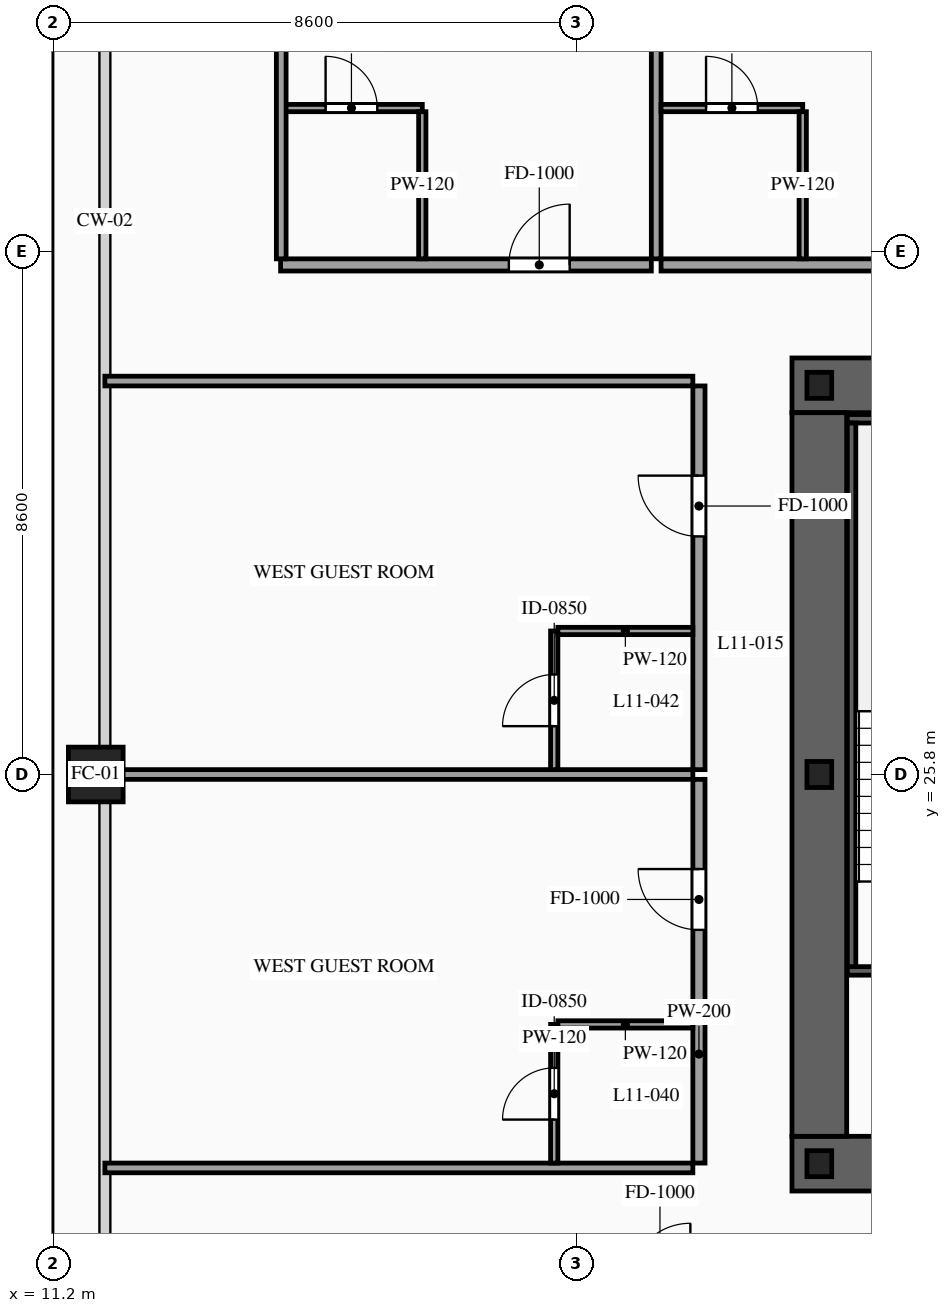
"""IFC4 building model, lengths in metres.
Left out: names, types, materials, properties, quantities, classifications, styles, units other than length and angle.
Written with IfcOpenShell. Run it as: python <this file> out.ifc"""

import sys

from ifc_helpers import new_model, si_unit, direction, frame, frame_2d, origin, origin_2d, place, context, subcontext, project, spatial, rectangle, hollow_rectangle, i_section, extrude, source, transform, mapped, element, fill, save


model = new_model("IFC4")
c1 = context("Model", 3, precision=1e-05, world=origin(), true_north=direction((0.0, 1.0)))
c2 = subcontext(c1, "Body", "Model", "MODEL_VIEW")
j1 = project(units=[si_unit("LENGTHUNIT", "METRE"), si_unit("PLANEANGLEUNIT", "RADIAN")], contexts=[c1])
p1 = place(None, origin())
s1 = spatial("IfcSite", under=j1, at=p1, CompositionType="ELEMENT")
p2 = place(p1, origin())
s2 = spatial("IfcBuilding", under=s1, at=p2, CompositionType="ELEMENT")
p3 = place(p2, frame((0.0, 0.0, 46.0)))
s3 = spatial("IfcBuildingStorey", under=s2, at=p3, CompositionType="ELEMENT", Elevation=46.0)
p4 = place(p3, frame((23.35, 19.4, 0.0), z_axis=(0.0, 0.0, 1.0), x_axis=(1.0, 0.0, 0.0)))
e1 = element("IfcWall", 1, at=p4, inside=s3, PredefinedType="SHEAR", context=c2, shape_type="SweptSolid", body=[
    extrude(rectangle(XDim=27.3, YDim=0.9, at=frame_2d((13.65, 0.0))), origin(), (0.0, 0.0, 1.0), 3.6),
])
p5 = place(p4, frame((2.1, 0.0, 0.0)))
e2 = element("IfcOpeningElement", 2, at=p5, cuts=e1, PredefinedType="OPENING", context=c2, shape_type="SweptSolid", body=[
    extrude(rectangle(XDim=1.1, YDim=2.2, at=frame_2d((0.55, 1.1))), frame((0.0, 0.465, 0.0), z_axis=(0.0, -1.0, 0.0), x_axis=(1.0, 0.0, 0.0)), (0.0, 0.0, 1.0), 0.93),
])
p6 = place(p4, frame((10.0, 0.0, 0.0)))
e3 = element("IfcOpeningElement", 3, at=p6, cuts=e1, PredefinedType="OPENING", context=c2, shape_type="SweptSolid", body=[
    extrude(rectangle(XDim=1.1, YDim=2.2, at=frame_2d((0.55, 1.1))), frame((0.0, 0.465, 0.0), z_axis=(0.0, -1.0, 0.0), x_axis=(1.0, 0.0, 0.0)), (0.0, 0.0, 1.0), 0.93),
])
p7 = place(p4, frame((23.2, 0.0, 0.0)))
e4 = element("IfcOpeningElement", 4, at=p7, cuts=e1, PredefinedType="OPENING", context=c2, shape_type="SweptSolid", body=[
    extrude(rectangle(XDim=1.1, YDim=2.2, at=frame_2d((0.55, 1.1))), frame((0.0, 0.465, 0.0), z_axis=(0.0, -1.0, 0.0), x_axis=(1.0, 0.0, 0.0)), (0.0, 0.0, 1.0), 0.93),
])
p8 = place(p4, frame((19.82, 0.0, 0.0)))
e5 = element("IfcOpeningElement", 5, at=p8, cuts=e1, PredefinedType="OPENING", context=c2, shape_type="SweptSolid", body=[
    extrude(rectangle(XDim=0.9, YDim=2.15, at=frame_2d((0.45, 1.075))), frame((0.0, 0.465, 0.0), z_axis=(0.0, -1.0, 0.0), x_axis=(1.0, 0.0, 0.0)), (0.0, 0.0, 1.0), 0.93),
])
p9 = place(p4, frame((18.38, 0.0, 0.0)))
e6 = element("IfcOpeningElement", 6, at=p9, cuts=e1, PredefinedType="OPENING", context=c2, shape_type="SweptSolid", body=[
    extrude(rectangle(XDim=0.9, YDim=2.15, at=frame_2d((0.45, 1.075))), frame((0.0, 0.465, 0.0), z_axis=(0.0, -1.0, 0.0), x_axis=(1.0, 0.0, 0.0)), (0.0, 0.0, 1.0), 0.93),
])
p10 = place(p3, frame((23.35, 32.2, 0.0), z_axis=(0.0, 0.0, 1.0), x_axis=(1.0, 0.0, 0.0)))
e7 = element("IfcWall", 7, at=p10, inside=s3, PredefinedType="SHEAR", context=c2, shape_type="SweptSolid", body=[
    extrude(rectangle(XDim=27.3, YDim=0.9, at=frame_2d((13.65, 0.0))), origin(), (0.0, 0.0, 1.0), 3.6),
])
p11 = place(p10, frame((4.72, 0.0, 0.0)))
e8 = element("IfcOpeningElement", 8, at=p11, cuts=e7, PredefinedType="OPENING", context=c2, shape_type="SweptSolid", body=[
    extrude(rectangle(XDim=0.9, YDim=2.15, at=frame_2d((0.45, 1.075))), frame((0.0, 0.465, 0.0), z_axis=(0.0, -1.0, 0.0), x_axis=(1.0, 0.0, 0.0)), (0.0, 0.0, 1.0), 0.93),
])
p12 = place(p10, frame((10.0, 0.0, 0.0)))
e9 = element("IfcOpeningElement", 9, at=p12, cuts=e7, PredefinedType="OPENING", context=c2, shape_type="SweptSolid", body=[
    extrude(rectangle(XDim=1.1, YDim=2.2, at=frame_2d((0.55, 1.1))), frame((0.0, 0.465, 0.0), z_axis=(0.0, -1.0, 0.0), x_axis=(1.0, 0.0, 0.0)), (0.0, 0.0, 1.0), 0.93),
])
p13 = place(p10, frame((15.85, 0.0, 0.0)))
e10 = element("IfcOpeningElement", 10, at=p13, cuts=e7, PredefinedType="OPENING", context=c2, shape_type="SweptSolid", body=[
    extrude(rectangle(XDim=1.1, YDim=2.2, at=frame_2d((0.55, 1.1))), frame((0.0, 0.465, 0.0), z_axis=(0.0, -1.0, 0.0), x_axis=(1.0, 0.0, 0.0)), (0.0, 0.0, 1.0), 0.93),
])
p14 = place(p10, frame((19.05, 0.0, 0.0)))
e11 = element("IfcOpeningElement", 11, at=p14, cuts=e7, PredefinedType="OPENING", context=c2, shape_type="SweptSolid", body=[
    extrude(rectangle(XDim=0.9, YDim=2.15, at=frame_2d((0.45, 1.075))), frame((0.0, 0.465, 0.0), z_axis=(0.0, -1.0, 0.0), x_axis=(1.0, 0.0, 0.0)), (0.0, 0.0, 1.0), 0.93),
])
m1 = source(origin(), c2, "Body", "SweptSolid", [
    extrude(rectangle(XDim=11.9, YDim=0.9, at=frame_2d((5.95, 0.0))), origin(), (0.0, 0.0, 1.0), 3.6),
])
p15 = place(p3, frame((23.8, 19.85, 0.0), z_axis=(0.0, 0.0, 1.0), x_axis=(0.0, 1.0, 0.0)))
e12 = element("IfcWall", 12, at=p15, inside=s3, PredefinedType="SHEAR", context=c2, shape_type="MappedRepresentation", body=[
    mapped(m1, transform((0.0, 0.0, 0.0), scale=1.0)),
])
m2 = source(origin(), c2, "Body", "SweptSolid", [
    extrude(i_section(OverallWidth=0.407, OverallDepth=0.428, WebThickness=0.02, FlangeThickness=0.035, at=origin_2d()), origin(), (0.0, 0.0, 1.0), 3.6),
])
for number, where, z_axis, x_axis in (
    (13, (23.8, 19.4, 0.0), (0.0, 0.0, 1.0), (1.0, 0.0, 0.0)),
    (14, (23.8, 25.8, 0.0), (0.0, 0.0, 1.0), (1.0, 0.0, 0.0)),
    (15, (23.8, 32.2, 0.0), (0.0, 0.0, 1.0), (1.0, 0.0, 0.0)),
):
    element("IfcColumn", number, at=place(p3, frame(where, z_axis=z_axis, x_axis=x_axis)), inside=s3, PredefinedType="COLUMN", context=c2, shape_type="MappedRepresentation", body=[
        mapped(m2, transform((0.0, 0.0, 0.0), scale=1.0)),
    ])
m3 = source(origin(), c2, "Body", "SweptSolid", [
    extrude(hollow_rectangle(XDim=0.9, YDim=0.9, WallThickness=0.042, at=origin_2d()), origin(), (0.0, 0.0, 1.0), 3.6),
])
p16 = place(p3, frame((11.9, 25.8, 0.0), z_axis=(0.0, 0.0, 1.0), x_axis=(1.0, 0.0, 0.0)))
e16 = element("IfcColumn", 16, at=p16, inside=s3, PredefinedType="COLUMN", context=c2, shape_type="MappedRepresentation", body=[
    mapped(m3, transform((0.0, 0.0, 0.0), scale=1.0)),
])
p17 = place(p3, frame((24.26, 22.57, 0.0), z_axis=(0.0, 0.0, 1.0), x_axis=(1.0, 0.0, 0.0)))
e17 = element("IfcWall", 17, at=p17, inside=s3, PredefinedType="SOLIDWALL", context=c2, shape_type="SweptSolid", body=[
    extrude(rectangle(XDim=3.28, YDim=0.14, at=frame_2d((1.64, 0.0))), origin(), (0.0, 0.0, 1.0), 3.38),
])
p18 = place(p17, frame((1.09, 0.0, 0.0)))
e18 = element("IfcOpeningElement", 18, at=p18, cuts=e17, PredefinedType="OPENING", context=c2, shape_type="SweptSolid", body=[
    extrude(rectangle(XDim=1.1, YDim=2.2, at=frame_2d((0.55, 1.1))), frame((0.0, 0.085, 0.0), z_axis=(0.0, -1.0, 0.0), x_axis=(1.0, 0.0, 0.0)), (0.0, 0.0, 1.0), 0.17),
])
m4 = source(origin(), c2, "Body", "SweptSolid", [
    extrude(rectangle(XDim=3.28, YDim=0.14, at=frame_2d((1.64, 0.0))), origin(), (0.0, 0.0, 1.0), 3.38),
])
p19 = place(p3, frame((24.26, 31.65, 0.0), z_axis=(0.0, 0.0, 1.0), x_axis=(1.0, 0.0, 0.0)))
e19 = element("IfcWall", 19, at=p19, inside=s3, PredefinedType="SOLIDWALL", context=c2, shape_type="MappedRepresentation", body=[
    mapped(m4, transform((0.0, 0.0, 0.0), scale=1.0)),
])
m5 = source(origin(), c2, "Body", "SweptSolid", [
    extrude(rectangle(XDim=8.94, YDim=0.14, at=frame_2d((4.47, 0.0))), origin(), (0.0, 0.0, 1.0), 3.38),
])
p20 = place(p3, frame((24.33, 22.64, 0.0), z_axis=(0.0, 0.0, 1.0), x_axis=(0.0, 1.0, 0.0)))
e20 = element("IfcWall", 20, at=p20, inside=s3, PredefinedType="SOLIDWALL", context=c2, shape_type="MappedRepresentation", body=[
    mapped(m5, transform((0.0, 0.0, 0.0), scale=1.0)),
])
p21 = place(p3, frame((14.94, 34.18, 0.0), z_axis=(0.0, 0.0, 1.0), x_axis=(1.0, 0.0, 0.0)))
e21 = element("IfcWall", 21, at=p21, inside=s3, PredefinedType="PARTITIONING", context=c2, shape_type="SweptSolid", body=[
    extrude(rectangle(XDim=6.097, YDim=0.2, at=frame_2d((3.049, 0.0))), origin(), (0.0, 0.0, 1.0), 3.38),
])
p22 = place(p21, frame((3.754, 0.0, 0.0)))
e22 = element("IfcOpeningElement", 22, at=p22, cuts=e21, PredefinedType="OPENING", context=c2, shape_type="SweptSolid", body=[
    extrude(rectangle(XDim=1.0, YDim=2.2, at=frame_2d((0.5, 1.1))), frame((0.0, 0.115, 0.0), z_axis=(0.0, -1.0, 0.0), x_axis=(1.0, 0.0, 0.0)), (0.0, 0.0, 1.0), 0.23),
])
m6 = source(origin(), c2, "Body", "SweptSolid", [
    extrude(rectangle(XDim=16.47, YDim=0.16, at=frame_2d((8.235, 0.0))), origin(), (0.0, 0.0, 1.0), 3.38),
])
p23 = place(p3, frame((21.117, 34.28, 0.0), z_axis=(0.0, 0.0, 1.0), x_axis=(0.0, 1.0, 0.0)))
e23 = element("IfcWall", 23, at=p23, inside=s3, PredefinedType="PARTITIONING", context=c2, shape_type="MappedRepresentation", body=[
    mapped(m6, transform((0.0, 0.0, 0.0), scale=1.0)),
])
p24 = place(p3, frame((14.94, 36.76, 0.0), z_axis=(0.0, 0.0, 1.0), x_axis=(1.0, 0.0, 0.0)))
e24 = element("IfcWall", 24, at=p24, inside=s3, PredefinedType="PARTITIONING", context=c2, shape_type="SweptSolid", body=[
    extrude(rectangle(XDim=2.33, YDim=0.12, at=frame_2d((1.165, 0.0))), origin(), (0.0, 0.0, 1.0), 3.38),
])
p25 = place(p24, frame((0.74, 0.0, 0.0)))
e25 = element("IfcOpeningElement", 25, at=p25, cuts=e24, PredefinedType="OPENING", context=c2, shape_type="SweptSolid", body=[
    extrude(rectangle(XDim=0.85, YDim=2.1, at=frame_2d((0.425, 1.05))), frame((0.0, 0.075, 0.0), z_axis=(0.0, -1.0, 0.0), x_axis=(1.0, 0.0, 0.0)), (0.0, 0.0, 1.0), 0.15),
])
m7 = source(origin(), c2, "Body", "SweptSolid", [
    extrude(rectangle(XDim=2.42, YDim=0.12, at=frame_2d((1.21, 0.0))), origin(), (0.0, 0.0, 1.0), 3.38),
])
p26 = place(p3, frame((17.27, 34.28, 0.0), z_axis=(0.0, 0.0, 1.0), x_axis=(0.0, 1.0, 0.0)))
e26 = element("IfcWall", 26, at=p26, inside=s3, PredefinedType="PARTITIONING", context=c2, shape_type="MappedRepresentation", body=[
    mapped(m7, transform((0.0, 0.0, 0.0), scale=1.0)),
])
p27 = place(p3, frame((21.197, 34.18, 0.0), z_axis=(0.0, 0.0, 1.0), x_axis=(1.0, 0.0, 0.0)))
e27 = element("IfcWall", 27, at=p27, inside=s3, PredefinedType="PARTITIONING", context=c2, shape_type="SweptSolid", body=[
    extrude(rectangle(XDim=7.063, YDim=0.2, at=frame_2d((3.531, 0.0))), origin(), (0.0, 0.0, 1.0), 3.38),
])
p28 = place(p27, frame((4.237, 0.0, 0.0)))
e28 = element("IfcOpeningElement", 28, at=p28, cuts=e27, PredefinedType="OPENING", context=c2, shape_type="SweptSolid", body=[
    extrude(rectangle(XDim=1.0, YDim=2.2, at=frame_2d((0.5, 1.1))), frame((0.0, 0.115, 0.0), z_axis=(0.0, -1.0, 0.0), x_axis=(1.0, 0.0, 0.0)), (0.0, 0.0, 1.0), 0.23),
])
p29 = place(p3, frame((21.197, 36.76, 0.0), z_axis=(0.0, 0.0, 1.0), x_axis=(1.0, 0.0, 0.0)))
e29 = element("IfcWall", 29, at=p29, inside=s3, PredefinedType="PARTITIONING", context=c2, shape_type="SweptSolid", body=[
    extrude(rectangle(XDim=2.33, YDim=0.12, at=frame_2d((1.165, 0.0))), origin(), (0.0, 0.0, 1.0), 3.38),
])
p30 = place(p29, frame((0.74, 0.0, 0.0)))
e30 = element("IfcOpeningElement", 30, at=p30, cuts=e29, PredefinedType="OPENING", context=c2, shape_type="SweptSolid", body=[
    extrude(rectangle(XDim=0.85, YDim=2.1, at=frame_2d((0.425, 1.05))), frame((0.0, 0.075, 0.0), z_axis=(0.0, -1.0, 0.0), x_axis=(1.0, 0.0, 0.0)), (0.0, 0.0, 1.0), 0.15),
])
p31 = place(p3, frame((23.527, 34.28, 0.0), z_axis=(0.0, 0.0, 1.0), x_axis=(0.0, 1.0, 0.0)))
e31 = element("IfcWall", 31, at=p31, inside=s3, PredefinedType="PARTITIONING", context=c2, shape_type="MappedRepresentation", body=[
    mapped(m7, transform((0.0, 0.0, 0.0), scale=1.0)),
])
m8 = source(origin(), c2, "Body", "SweptSolid", [
    extrude(rectangle(XDim=16.32, YDim=0.16, at=frame_2d((8.16, 0.0))), origin(), (0.0, 0.0, 1.0), 3.38),
])
p32 = place(p3, frame((14.95, 34.28, 0.0), z_axis=(0.0, 0.0, 1.0), x_axis=(0.0, 1.0, 0.0)))
e32 = element("IfcWall", 32, at=p32, inside=s3, PredefinedType="PARTITIONING", context=c2, shape_type="MappedRepresentation", body=[
    mapped(m8, transform((0.0, 0.0, 0.0), scale=1.0)),
])
p33 = place(p3, frame((21.82, 19.41, 0.0), z_axis=(0.0, 0.0, 1.0), x_axis=(0.0, 1.0, 0.0)))
e33 = element("IfcWall", 33, at=p33, inside=s3, PredefinedType="PARTITIONING", context=c2, shape_type="SweptSolid", body=[
    extrude(rectangle(XDim=6.31, YDim=0.2, at=frame_2d((3.155, 0.0))), origin(), (0.0, 0.0, 1.0), 3.38),
])
p34 = place(p33, frame((3.835, 0.0, 0.0)))
e34 = element("IfcOpeningElement", 34, at=p34, cuts=e33, PredefinedType="OPENING", context=c2, shape_type="SweptSolid", body=[
    extrude(rectangle(XDim=1.0, YDim=2.2, at=frame_2d((0.5, 1.1))), frame((0.0, 0.115, 0.0), z_axis=(0.0, -1.0, 0.0), x_axis=(1.0, 0.0, 0.0)), (0.0, 0.0, 1.0), 0.23),
])
m9 = source(origin(), c2, "Body", "SweptSolid", [
    extrude(rectangle(XDim=9.67, YDim=0.16, at=frame_2d((4.835, 0.0))), origin(), (0.0, 0.0, 1.0), 2.575),
])
p35 = place(p3, frame((12.05, 25.8, 0.0), z_axis=(0.0, 0.0, 1.0), x_axis=(1.0, 0.0, 0.0)))
e35 = element("IfcWall", 35, at=p35, inside=s3, PredefinedType="PARTITIONING", context=c2, shape_type="MappedRepresentation", body=[
    mapped(m9, transform((0.0, 0.0, 0.0), scale=1.0)),
])
m10 = source(origin(), c2, "Body", "SweptSolid", [
    extrude(rectangle(XDim=9.67, YDim=0.16, at=frame_2d((4.835, 0.0))), origin(), (0.0, 0.0, 1.0), 2.875),
])
p36 = place(p3, frame((12.05, 19.33, 0.0), z_axis=(0.0, 0.0, 1.0), x_axis=(1.0, 0.0, 0.0)))
e36 = element("IfcWall", 36, at=p36, inside=s3, PredefinedType="PARTITIONING", context=c2, shape_type="MappedRepresentation", body=[
    mapped(m10, transform((0.0, 0.0, 0.0), scale=1.0)),
])
p37 = place(p3, frame((19.44, 19.41, 0.0), z_axis=(0.0, 0.0, 1.0), x_axis=(0.0, 1.0, 0.0)))
e37 = element("IfcWall", 37, at=p37, inside=s3, PredefinedType="PARTITIONING", context=c2, shape_type="SweptSolid", body=[
    extrude(rectangle(XDim=2.28, YDim=0.12, at=frame_2d((1.14, 0.0))), origin(), (0.0, 0.0, 1.0), 3.38),
])
p38 = place(p37, frame((0.715, 0.0, 0.0)))
e38 = element("IfcOpeningElement", 38, at=p38, cuts=e37, PredefinedType="OPENING", context=c2, shape_type="SweptSolid", body=[
    extrude(rectangle(XDim=0.85, YDim=2.1, at=frame_2d((0.425, 1.05))), frame((0.0, 0.075, 0.0), z_axis=(0.0, -1.0, 0.0), x_axis=(1.0, 0.0, 0.0)), (0.0, 0.0, 1.0), 0.15),
])
m11 = source(origin(), c2, "Body", "SweptSolid", [
    extrude(rectangle(XDim=2.22, YDim=0.12, at=frame_2d((1.11, 0.0))), origin(), (0.0, 0.0, 1.0), 3.38),
])
p39 = place(p3, frame((19.5, 21.69, 0.0), z_axis=(0.0, 0.0, 1.0), x_axis=(1.0, 0.0, 0.0)))
e39 = element("IfcWall", 39, at=p39, inside=s3, PredefinedType="PARTITIONING", context=c2, shape_type="MappedRepresentation", body=[
    mapped(m11, transform((0.0, 0.0, 0.0), scale=1.0)),
])
p40 = place(p3, frame((21.82, 25.88, 0.0), z_axis=(0.0, 0.0, 1.0), x_axis=(0.0, 1.0, 0.0)))
e40 = element("IfcWall", 40, at=p40, inside=s3, PredefinedType="PARTITIONING", context=c2, shape_type="SweptSolid", body=[
    extrude(rectangle(XDim=6.31, YDim=0.2, at=frame_2d((3.155, 0.0))), origin(), (0.0, 0.0, 1.0), 3.38),
])
p41 = place(p40, frame((3.835, 0.0, 0.0)))
e41 = element("IfcOpeningElement", 41, at=p41, cuts=e40, PredefinedType="OPENING", context=c2, shape_type="SweptSolid", body=[
    extrude(rectangle(XDim=1.0, YDim=2.2, at=frame_2d((0.5, 1.1))), frame((0.0, 0.115, 0.0), z_axis=(0.0, -1.0, 0.0), x_axis=(1.0, 0.0, 0.0)), (0.0, 0.0, 1.0), 0.23),
])
p42 = place(p3, frame((12.05, 32.27, 0.0), z_axis=(0.0, 0.0, 1.0), x_axis=(1.0, 0.0, 0.0)))
e42 = element("IfcWall", 42, at=p42, inside=s3, PredefinedType="PARTITIONING", context=c2, shape_type="MappedRepresentation", body=[
    mapped(m10, transform((0.0, 0.0, 0.0), scale=1.0)),
])
p43 = place(p3, frame((19.44, 25.88, 0.0), z_axis=(0.0, 0.0, 1.0), x_axis=(0.0, 1.0, 0.0)))
e43 = element("IfcWall", 43, at=p43, inside=s3, PredefinedType="PARTITIONING", context=c2, shape_type="SweptSolid", body=[
    extrude(rectangle(XDim=2.28, YDim=0.12, at=frame_2d((1.14, 0.0))), origin(), (0.0, 0.0, 1.0), 3.38),
])
p44 = place(p43, frame((0.715, 0.0, 0.0)))
e44 = element("IfcOpeningElement", 44, at=p44, cuts=e43, PredefinedType="OPENING", context=c2, shape_type="SweptSolid", body=[
    extrude(rectangle(XDim=0.85, YDim=2.1, at=frame_2d((0.425, 1.05))), frame((0.0, 0.075, 0.0), z_axis=(0.0, -1.0, 0.0), x_axis=(1.0, 0.0, 0.0)), (0.0, 0.0, 1.0), 0.15),
])
p45 = place(p3, frame((19.5, 28.16, 0.0), z_axis=(0.0, 0.0, 1.0), x_axis=(1.0, 0.0, 0.0)))
e45 = element("IfcWall", 45, at=p45, inside=s3, PredefinedType="PARTITIONING", context=c2, shape_type="MappedRepresentation", body=[
    mapped(m11, transform((0.0, 0.0, 0.0), scale=1.0)),
])
m12 = source(origin(), c2, "Body", "SweptSolid", [
    extrude(rectangle(XDim=1.0, YDim=2.2, at=frame_2d((0.5, 1.1))), frame((0.0, 0.025, 0.0), z_axis=(0.0, -1.0, 0.0), x_axis=(1.0, 0.0, 0.0)), (0.0, 0.0, 1.0), 0.05),
])
p46 = place(p22, origin())
e46 = element("IfcDoor", 46, at=p46, inside=s3, OperationType="SINGLE_SWING_RIGHT", PredefinedType="DOOR", context=c2, shape_type="MappedRepresentation", body=[
    mapped(m12, transform((0.0, 0.0, 0.0), scale=1.0)),
])
fill(e22, e46)
m13 = source(origin(), c2, "Body", "SweptSolid", [
    extrude(rectangle(XDim=0.85, YDim=2.1, at=frame_2d((0.425, 1.05))), frame((0.0, 0.025, 0.0), z_axis=(0.0, -1.0, 0.0), x_axis=(1.0, 0.0, 0.0)), (0.0, 0.0, 1.0), 0.05),
])
p47 = place(p25, origin())
e47 = element("IfcDoor", 47, at=p47, inside=s3, OperationType="SINGLE_SWING_LEFT", PredefinedType="DOOR", context=c2, shape_type="MappedRepresentation", body=[
    mapped(m13, transform((0.0, 0.0, 0.0), scale=1.0)),
])
fill(e25, e47)
p48 = place(p30, origin())
e48 = element("IfcDoor", 48, at=p48, inside=s3, OperationType="SINGLE_SWING_LEFT", PredefinedType="DOOR", context=c2, shape_type="MappedRepresentation", body=[
    mapped(m13, transform((0.0, 0.0, 0.0), scale=1.0)),
])
fill(e30, e48)
p49 = place(p34, origin())
e49 = element("IfcDoor", 49, at=p49, inside=s3, OperationType="SINGLE_SWING_RIGHT", PredefinedType="DOOR", context=c2, shape_type="MappedRepresentation", body=[
    mapped(m12, transform((0.0, 0.0, 0.0), scale=1.0)),
])
fill(e34, e49)
p50 = place(p38, origin())
e50 = element("IfcDoor", 50, at=p50, inside=s3, OperationType="SINGLE_SWING_LEFT", PredefinedType="DOOR", context=c2, shape_type="MappedRepresentation", body=[
    mapped(m13, transform((0.0, 0.0, 0.0), scale=1.0)),
])
fill(e38, e50)
p51 = place(p41, origin())
e51 = element("IfcDoor", 51, at=p51, inside=s3, OperationType="SINGLE_SWING_RIGHT", PredefinedType="DOOR", context=c2, shape_type="MappedRepresentation", body=[
    mapped(m12, transform((0.0, 0.0, 0.0), scale=1.0)),
])
fill(e41, e51)
p52 = place(p44, origin())
e52 = element("IfcDoor", 52, at=p52, inside=s3, OperationType="SINGLE_SWING_LEFT", PredefinedType="DOOR", context=c2, shape_type="MappedRepresentation", body=[
    mapped(m13, transform((0.0, 0.0, 0.0), scale=1.0)),
])
fill(e44, e52)
save(model, sys.argv[1])
